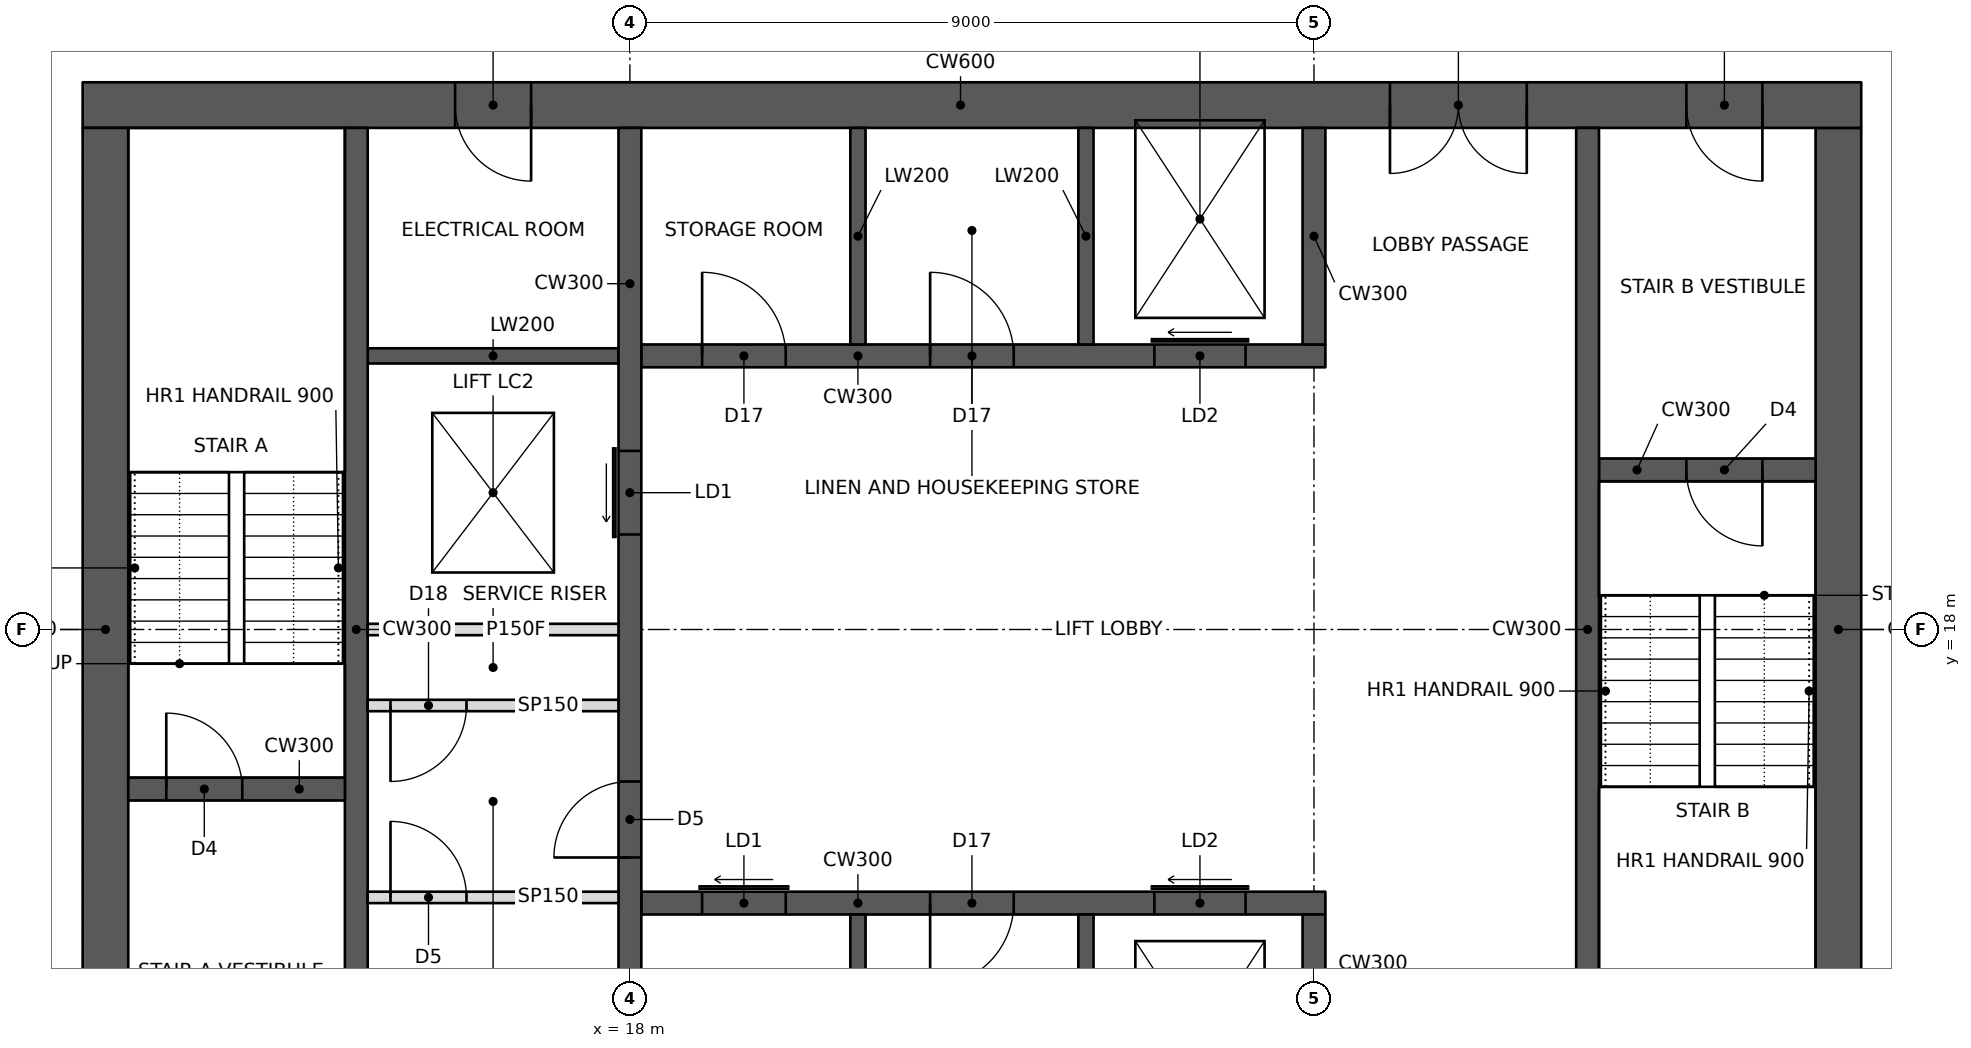
"""IFC4 building model, lengths in metres.
Left out: names, types, materials, properties, quantities, classifications, styles, units other than length and angle.
Written with IfcOpenShell. Run it as: python <this file> out.ifc"""

import sys

from ifc_helpers import new_model, si_unit, direction, frame, frame_2d, origin, place, context, subcontext, project, spatial, rectangle, extrude, element, fill, save


model = new_model("IFC4")
c1 = context("Model", 3, precision=1e-05, world=origin(), true_north=direction((0.0, 1.0)))
c2 = subcontext(c1, "Body", "Model", "MODEL_VIEW")
j1 = project(units=[si_unit("LENGTHUNIT", "METRE"), si_unit("PLANEANGLEUNIT", "RADIAN")], contexts=[c1])
p1 = place(None, origin())
s1 = spatial("IfcSite", under=j1, at=p1, CompositionType="ELEMENT")
p2 = place(p1, origin())
s2 = spatial("IfcBuilding", under=s1, at=p2, CompositionType="ELEMENT")
p3 = place(p2, frame((0.0, 0.0, 194.4)))
s3 = spatial("IfcBuildingStorey", under=s2, at=p3, CompositionType="ELEMENT", Elevation=194.4)
p4 = place(p3, frame((10.8, 24.9, 0.0), z_axis=(0.0, 0.0, 1.0), x_axis=(1.0, 0.0, 0.0)))
e1 = element("IfcWall", 1, at=p4, inside=s3, PredefinedType="SHEAR", context=c2, shape_type="SweptSolid", body=[
    extrude(rectangle(XDim=23.4, YDim=0.6, at=frame_2d((11.7, 0.0))), origin(), (0.0, 0.0, 1.0), 3.4),
])
p5 = place(p4, frame((17.2, 0.0, 0.0)))
e2 = element("IfcOpeningElement", 2, at=p5, cuts=e1, PredefinedType="OPENING", context=c2, shape_type="SweptSolid", body=[
    extrude(rectangle(XDim=1.8, YDim=2.1, at=frame_2d((0.9, 1.05))), frame((0.0, 0.31, 0.0), z_axis=(0.0, -1.0, 0.0), x_axis=(1.0, 0.0, 0.0)), (0.0, 0.0, 1.0), 0.62),
])
p6 = place(p4, frame((21.1, 0.0, 0.0)))
e3 = element("IfcOpeningElement", 3, at=p6, cuts=e1, PredefinedType="OPENING", context=c2, shape_type="SweptSolid", body=[
    extrude(rectangle(XDim=1.0, YDim=2.1, at=frame_2d((0.5, 1.05))), frame((0.0, 0.31, 0.0), z_axis=(0.0, -1.0, 0.0), x_axis=(1.0, 0.0, 0.0)), (0.0, 0.0, 1.0), 0.62),
])
p7 = place(p4, frame((4.9, 0.0, 0.0)))
e4 = element("IfcOpeningElement", 4, at=p7, cuts=e1, PredefinedType="OPENING", context=c2, shape_type="SweptSolid", body=[
    extrude(rectangle(XDim=1.0, YDim=2.1, at=frame_2d((0.5, 1.05))), frame((0.0, 0.31, 0.0), z_axis=(0.0, -1.0, 0.0), x_axis=(1.0, 0.0, 0.0)), (0.0, 0.0, 1.0), 0.62),
])
for number, where, z_axis, x_axis in (
    (5, (11.1, 11.4, 0.0), (0.0, 0.0, 1.0), (0.0, 1.0, 0.0)),
    (6, (33.9, 11.4, 0.0), (0.0, 0.0, 1.0), (0.0, 1.0, 0.0)),
):
    element("IfcWall", number, at=place(p3, frame(where, z_axis=z_axis, x_axis=x_axis)), inside=s3, PredefinedType="SHEAR", context=c2, shape_type="SweptSolid", body=[
        extrude(rectangle(XDim=13.2, YDim=0.6, at=frame_2d((6.6, 0.0))), origin(), (0.0, 0.0, 1.0), 3.4),
    ])
p8 = place(p3, frame((14.4, 11.4, 0.0), z_axis=(0.0, 0.0, 1.0), x_axis=(0.0, 1.0, 0.0)))
e7 = element("IfcWall", 7, at=p8, inside=s3, PredefinedType="SHEAR", context=c2, shape_type="SweptSolid", body=[
    extrude(rectangle(XDim=13.2, YDim=0.3, at=frame_2d((6.6, 0.0))), origin(), (0.0, 0.0, 1.0), 3.4),
])
p9 = place(p3, frame((11.4, 15.9, 0.0), z_axis=(0.0, 0.0, 1.0), x_axis=(1.0, 0.0, 0.0)))
e8 = element("IfcWall", 8, at=p9, inside=s3, PredefinedType="SHEAR", context=c2, shape_type="SweptSolid", body=[
    extrude(rectangle(XDim=2.85, YDim=0.3, at=frame_2d((1.425, 0.0))), origin(), (0.0, 0.0, 1.0), 3.4),
])
p10 = place(p9, frame((0.5, 0.0, 0.0)))
e9 = element("IfcOpeningElement", 9, at=p10, cuts=e8, PredefinedType="OPENING", context=c2, shape_type="SweptSolid", body=[
    extrude(rectangle(XDim=1.0, YDim=2.1, at=frame_2d((0.5, 1.05))), frame((0.0, 0.16, 0.0), z_axis=(0.0, -1.0, 0.0), x_axis=(1.0, 0.0, 0.0)), (0.0, 0.0, 1.0), 0.32),
])
p11 = place(p3, frame((18.0, 11.4, 0.0), z_axis=(0.0, 0.0, 1.0), x_axis=(0.0, 1.0, 0.0)))
e10 = element("IfcWall", 10, at=p11, inside=s3, PredefinedType="SHEAR", context=c2, shape_type="SweptSolid", body=[
    extrude(rectangle(XDim=13.2, YDim=0.3, at=frame_2d((6.6, 0.0))), origin(), (0.0, 0.0, 1.0), 3.4),
])
p12 = place(p11, frame((3.6, 0.0, 0.0)))
e11 = element("IfcOpeningElement", 11, at=p12, cuts=e10, PredefinedType="OPENING", context=c2, shape_type="SweptSolid", body=[
    extrude(rectangle(XDim=1.0, YDim=2.1, at=frame_2d((0.5, 1.05))), frame((0.0, 0.16, 0.0), z_axis=(0.0, -1.0, 0.0), x_axis=(1.0, 0.0, 0.0)), (0.0, 0.0, 1.0), 0.32),
])
p13 = place(p11, frame((7.85, 0.0, 0.0)))
e12 = element("IfcOpeningElement", 12, at=p13, cuts=e10, PredefinedType="OPENING", context=c2, shape_type="SweptSolid", body=[
    extrude(rectangle(XDim=1.1, YDim=2.1, at=frame_2d((0.55, 1.05))), frame((0.0, 0.16, 0.0), z_axis=(0.0, -1.0, 0.0), x_axis=(1.0, 0.0, 0.0)), (0.0, 0.0, 1.0), 0.32),
])
p14 = place(p3, frame((14.55, 18.0, 0.0), z_axis=(0.0, 0.0, 1.0), x_axis=(1.0, 0.0, 0.0)))
e13 = element("IfcWall", 13, at=p14, inside=s3, PredefinedType="PARTITIONING", context=c2, shape_type="SweptSolid", body=[
    extrude(rectangle(XDim=3.3, YDim=0.15, at=frame_2d((1.65, 0.0))), origin(), (0.0, 0.0, 1.0), 3.2),
])
p15 = place(p3, frame((18.15, 14.4, 0.0), z_axis=(0.0, 0.0, 1.0), x_axis=(1.0, 0.0, 0.0)))
e14 = element("IfcWall", 14, at=p15, inside=s3, PredefinedType="SHEAR", context=c2, shape_type="SweptSolid", body=[
    extrude(rectangle(XDim=9.0, YDim=0.3, at=frame_2d((4.5, 0.0))), origin(), (0.0, 0.0, 1.0), 3.4),
])
p16 = place(p15, frame((0.8, 0.0, 0.0)))
e15 = element("IfcOpeningElement", 15, at=p16, cuts=e14, PredefinedType="OPENING", context=c2, shape_type="SweptSolid", body=[
    extrude(rectangle(XDim=1.1, YDim=2.1, at=frame_2d((0.55, 1.05))), frame((0.0, 0.16, 0.0), z_axis=(0.0, -1.0, 0.0), x_axis=(1.0, 0.0, 0.0)), (0.0, 0.0, 1.0), 0.32),
])
p17 = place(p15, frame((6.75, 0.0, 0.0)))
e16 = element("IfcOpeningElement", 16, at=p17, cuts=e14, PredefinedType="OPENING", context=c2, shape_type="SweptSolid", body=[
    extrude(rectangle(XDim=1.2, YDim=2.1, at=frame_2d((0.6, 1.05))), frame((0.0, 0.16, 0.0), z_axis=(0.0, -1.0, 0.0), x_axis=(1.0, 0.0, 0.0)), (0.0, 0.0, 1.0), 0.32),
])
p18 = place(p15, frame((3.8, 0.0, 0.0)))
e17 = element("IfcOpeningElement", 17, at=p18, cuts=e14, PredefinedType="OPENING", context=c2, shape_type="SweptSolid", body=[
    extrude(rectangle(XDim=1.1, YDim=2.1, at=frame_2d((0.55, 1.05))), frame((0.0, 0.16, 0.0), z_axis=(0.0, -1.0, 0.0), x_axis=(1.0, 0.0, 0.0)), (0.0, 0.0, 1.0), 0.32),
])
p19 = place(p3, frame((27.0, 11.4, 0.0), z_axis=(0.0, 0.0, 1.0), x_axis=(0.0, 1.0, 0.0)))
e18 = element("IfcWall", 18, at=p19, inside=s3, PredefinedType="SHEAR", context=c2, shape_type="SweptSolid", body=[
    extrude(rectangle(XDim=2.85, YDim=0.3, at=frame_2d((1.425, 0.0))), origin(), (0.0, 0.0, 1.0), 3.4),
])
for number, where, z_axis, x_axis in (
    (19, (21.0, 11.4, 0.0), (0.0, 0.0, 1.0), (0.0, 1.0, 0.0)),
    (20, (24.0, 11.4, 0.0), (0.0, 0.0, 1.0), (0.0, 1.0, 0.0)),
):
    element("IfcWall", number, at=place(p3, frame(where, z_axis=z_axis, x_axis=x_axis)), inside=s3, PredefinedType="SHEAR", context=c2, shape_type="SweptSolid", body=[
        extrude(rectangle(XDim=2.85, YDim=0.2, at=frame_2d((1.425, 0.0))), origin(), (0.0, 0.0, 1.0), 3.4),
    ])
p20 = place(p3, frame((18.15, 21.6, 0.0), z_axis=(0.0, 0.0, 1.0), x_axis=(1.0, 0.0, 0.0)))
e21 = element("IfcWall", 21, at=p20, inside=s3, PredefinedType="SHEAR", context=c2, shape_type="SweptSolid", body=[
    extrude(rectangle(XDim=9.0, YDim=0.3, at=frame_2d((4.5, 0.0))), origin(), (0.0, 0.0, 1.0), 3.4),
])
p21 = place(p20, frame((6.75, 0.0, 0.0)))
e22 = element("IfcOpeningElement", 22, at=p21, cuts=e21, PredefinedType="OPENING", context=c2, shape_type="SweptSolid", body=[
    extrude(rectangle(XDim=1.2, YDim=2.1, at=frame_2d((0.6, 1.05))), frame((0.0, 0.16, 0.0), z_axis=(0.0, -1.0, 0.0), x_axis=(1.0, 0.0, 0.0)), (0.0, 0.0, 1.0), 0.32),
])
p22 = place(p20, frame((0.8, 0.0, 0.0)))
e23 = element("IfcOpeningElement", 23, at=p22, cuts=e21, PredefinedType="OPENING", context=c2, shape_type="SweptSolid", body=[
    extrude(rectangle(XDim=1.1, YDim=2.1, at=frame_2d((0.55, 1.05))), frame((0.0, 0.16, 0.0), z_axis=(0.0, -1.0, 0.0), x_axis=(1.0, 0.0, 0.0)), (0.0, 0.0, 1.0), 0.32),
])
p23 = place(p20, frame((3.8, 0.0, 0.0)))
e24 = element("IfcOpeningElement", 24, at=p23, cuts=e21, PredefinedType="OPENING", context=c2, shape_type="SweptSolid", body=[
    extrude(rectangle(XDim=1.1, YDim=2.1, at=frame_2d((0.55, 1.05))), frame((0.0, 0.16, 0.0), z_axis=(0.0, -1.0, 0.0), x_axis=(1.0, 0.0, 0.0)), (0.0, 0.0, 1.0), 0.32),
])
p24 = place(p3, frame((27.0, 21.75, 0.0), z_axis=(0.0, 0.0, 1.0), x_axis=(0.0, 1.0, 0.0)))
e25 = element("IfcWall", 25, at=p24, inside=s3, PredefinedType="SHEAR", context=c2, shape_type="SweptSolid", body=[
    extrude(rectangle(XDim=2.85, YDim=0.3, at=frame_2d((1.425, 0.0))), origin(), (0.0, 0.0, 1.0), 3.4),
])
for number, where, z_axis, x_axis in (
    (26, (21.0, 21.75, 0.0), (0.0, 0.0, 1.0), (0.0, 1.0, 0.0)),
    (27, (24.0, 21.75, 0.0), (0.0, 0.0, 1.0), (0.0, 1.0, 0.0)),
):
    element("IfcWall", number, at=place(p3, frame(where, z_axis=z_axis, x_axis=x_axis)), inside=s3, PredefinedType="SHEAR", context=c2, shape_type="SweptSolid", body=[
        extrude(rectangle(XDim=2.85, YDim=0.2, at=frame_2d((1.425, 0.0))), origin(), (0.0, 0.0, 1.0), 3.4),
    ])
p25 = place(p3, frame((30.6, 11.4, 0.0), z_axis=(0.0, 0.0, 1.0), x_axis=(0.0, 1.0, 0.0)))
e28 = element("IfcWall", 28, at=p25, inside=s3, PredefinedType="SHEAR", context=c2, shape_type="SweptSolid", body=[
    extrude(rectangle(XDim=13.2, YDim=0.3, at=frame_2d((6.6, 0.0))), origin(), (0.0, 0.0, 1.0), 3.4),
])
p26 = place(p3, frame((30.75, 20.1, 0.0), z_axis=(0.0, 0.0, 1.0), x_axis=(1.0, 0.0, 0.0)))
e29 = element("IfcWall", 29, at=p26, inside=s3, PredefinedType="SHEAR", context=c2, shape_type="SweptSolid", body=[
    extrude(rectangle(XDim=2.85, YDim=0.3, at=frame_2d((1.425, 0.0))), origin(), (0.0, 0.0, 1.0), 3.4),
])
p27 = place(p26, frame((1.15, 0.0, 0.0)))
e30 = element("IfcOpeningElement", 30, at=p27, cuts=e29, PredefinedType="OPENING", context=c2, shape_type="SweptSolid", body=[
    extrude(rectangle(XDim=1.0, YDim=2.1, at=frame_2d((0.5, 1.05))), frame((0.0, 0.16, 0.0), z_axis=(0.0, -1.0, 0.0), x_axis=(1.0, 0.0, 0.0)), (0.0, 0.0, 1.0), 0.32),
])
p28 = place(p3, frame((14.55, 21.6, 0.0), z_axis=(0.0, 0.0, 1.0), x_axis=(1.0, 0.0, 0.0)))
e31 = element("IfcWall", 31, at=p28, inside=s3, PredefinedType="SHEAR", context=c2, shape_type="SweptSolid", body=[
    extrude(rectangle(XDim=3.3, YDim=0.2, at=frame_2d((1.65, 0.0))), origin(), (0.0, 0.0, 1.0), 3.4),
])
p29 = place(p3, frame((14.55, 17.0, 0.0), z_axis=(0.0, 0.0, 1.0), x_axis=(1.0, 0.0, 0.0)))
e32 = element("IfcWall", 32, at=p29, inside=s3, PredefinedType="PARTITIONING", context=c2, shape_type="SweptSolid", body=[
    extrude(rectangle(XDim=3.3, YDim=0.15, at=frame_2d((1.65, 0.0))), origin(), (0.0, 0.0, 1.0), 3.2),
])
p30 = place(p29, frame((0.3, 0.0, 0.0)))
e33 = element("IfcOpeningElement", 33, at=p30, cuts=e32, PredefinedType="OPENING", context=c2, shape_type="SweptSolid", body=[
    extrude(rectangle(XDim=1.0, YDim=2.1, at=frame_2d((0.5, 1.05))), frame((0.0, 0.085, 0.0), z_axis=(0.0, -1.0, 0.0), x_axis=(1.0, 0.0, 0.0)), (0.0, 0.0, 1.0), 0.17),
])
p31 = place(p3, frame((14.55, 14.475, 0.0), z_axis=(0.0, 0.0, 1.0), x_axis=(1.0, 0.0, 0.0)))
e34 = element("IfcWall", 34, at=p31, inside=s3, PredefinedType="PARTITIONING", context=c2, shape_type="SweptSolid", body=[
    extrude(rectangle(XDim=3.3, YDim=0.15, at=frame_2d((1.65, 0.0))), origin(), (0.0, 0.0, 1.0), 3.2),
])
p32 = place(p31, frame((0.3, 0.0, 0.0)))
e35 = element("IfcOpeningElement", 35, at=p32, cuts=e34, PredefinedType="OPENING", context=c2, shape_type="SweptSolid", body=[
    extrude(rectangle(XDim=1.0, YDim=2.1, at=frame_2d((0.5, 1.05))), frame((0.0, 0.085, 0.0), z_axis=(0.0, -1.0, 0.0), x_axis=(1.0, 0.0, 0.0)), (0.0, 0.0, 1.0), 0.17),
])
p33 = place(p30, frame((1.0, 0.0, 0.0), z_axis=(0.0, 0.0, 1.0), x_axis=(-1.0, 0.0, 0.0)))
e36 = element("IfcDoor", 36, at=p33, inside=s3, OperationType="SINGLE_SWING_RIGHT", PredefinedType="DOOR", context=c2, shape_type="SweptSolid", body=[
    extrude(rectangle(XDim=1.0, YDim=2.1, at=frame_2d((0.5, 1.05))), frame((0.0, 0.025, 0.0), z_axis=(0.0, -1.0, 0.0), x_axis=(1.0, 0.0, 0.0)), (0.0, 0.0, 1.0), 0.05),
])
fill(e33, e36)
p34 = place(p32, origin())
e37 = element("IfcDoor", 37, at=p34, inside=s3, OperationType="SINGLE_SWING_LEFT", PredefinedType="DOOR", context=c2, shape_type="SweptSolid", body=[
    extrude(rectangle(XDim=1.0, YDim=2.1, at=frame_2d((0.5, 1.05))), frame((0.0, 0.025, 0.0), z_axis=(0.0, -1.0, 0.0), x_axis=(1.0, 0.0, 0.0)), (0.0, 0.0, 1.0), 0.05),
])
fill(e35, e37)
p35 = place(p10, origin())
e38 = element("IfcDoor", 38, at=p35, inside=s3, OperationType="SINGLE_SWING_LEFT", PredefinedType="DOOR", context=c2, shape_type="SweptSolid", body=[
    extrude(rectangle(XDim=1.0, YDim=2.1, at=frame_2d((0.5, 1.05))), frame((0.0, 0.025, 0.0), z_axis=(0.0, -1.0, 0.0), x_axis=(1.0, 0.0, 0.0)), (0.0, 0.0, 1.0), 0.05),
])
fill(e9, e38)
p36 = place(p5, frame((1.8, 0.0, 0.0), z_axis=(0.0, 0.0, 1.0), x_axis=(-1.0, 0.0, 0.0)))
e39 = element("IfcDoor", 39, at=p36, inside=s3, OperationType="DOUBLE_DOOR_SINGLE_SWING", PredefinedType="DOOR", context=c2, shape_type="SweptSolid", body=[
    extrude(rectangle(XDim=1.8, YDim=2.1, at=frame_2d((0.9, 1.05))), frame((0.0, 0.025, 0.0), z_axis=(0.0, -1.0, 0.0), x_axis=(1.0, 0.0, 0.0)), (0.0, 0.0, 1.0), 0.05),
])
fill(e2, e39)
p37 = place(p6, frame((1.0, 0.0, 0.0), z_axis=(0.0, 0.0, 1.0), x_axis=(-1.0, 0.0, 0.0)))
e40 = element("IfcDoor", 40, at=p37, inside=s3, OperationType="SINGLE_SWING_LEFT", PredefinedType="DOOR", context=c2, shape_type="SweptSolid", body=[
    extrude(rectangle(XDim=1.0, YDim=2.1, at=frame_2d((0.5, 1.05))), frame((0.0, 0.025, 0.0), z_axis=(0.0, -1.0, 0.0), x_axis=(1.0, 0.0, 0.0)), (0.0, 0.0, 1.0), 0.05),
])
fill(e3, e40)
p38 = place(p27, frame((1.0, 0.0, 0.0), z_axis=(0.0, 0.0, 1.0), x_axis=(-1.0, 0.0, 0.0)))
e41 = element("IfcDoor", 41, at=p38, inside=s3, OperationType="SINGLE_SWING_LEFT", PredefinedType="DOOR", context=c2, shape_type="SweptSolid", body=[
    extrude(rectangle(XDim=1.0, YDim=2.1, at=frame_2d((0.5, 1.05))), frame((0.0, 0.025, 0.0), z_axis=(0.0, -1.0, 0.0), x_axis=(1.0, 0.0, 0.0)), (0.0, 0.0, 1.0), 0.05),
])
fill(e30, e41)
p39 = place(p12, origin())
e42 = element("IfcDoor", 42, at=p39, inside=s3, OperationType="SINGLE_SWING_LEFT", PredefinedType="DOOR", context=c2, shape_type="SweptSolid", body=[
    extrude(rectangle(XDim=1.0, YDim=2.1, at=frame_2d((0.5, 1.05))), frame((0.0, 0.025, 0.0), z_axis=(0.0, -1.0, 0.0), x_axis=(1.0, 0.0, 0.0)), (0.0, 0.0, 1.0), 0.05),
])
fill(e11, e42)
p40 = place(p7, frame((1.0, 0.0, 0.0), z_axis=(0.0, 0.0, 1.0), x_axis=(-1.0, 0.0, 0.0)))
e43 = element("IfcDoor", 43, at=p40, inside=s3, OperationType="SINGLE_SWING_LEFT", PredefinedType="DOOR", context=c2, shape_type="SweptSolid", body=[
    extrude(rectangle(XDim=1.0, YDim=2.1, at=frame_2d((0.5, 1.05))), frame((0.0, 0.025, 0.0), z_axis=(0.0, -1.0, 0.0), x_axis=(1.0, 0.0, 0.0)), (0.0, 0.0, 1.0), 0.05),
])
fill(e4, e43)
p41 = place(p16, origin())
e44 = element("IfcDoor", 44, at=p41, inside=s3, OperationType="SLIDING_TO_LEFT", PredefinedType="DOOR", context=c2, shape_type="SweptSolid", body=[
    extrude(rectangle(XDim=1.1, YDim=2.1, at=frame_2d((0.55, 1.05))), frame((0.0, 0.025, 0.0), z_axis=(0.0, -1.0, 0.0), x_axis=(1.0, 0.0, 0.0)), (0.0, 0.0, 1.0), 0.05),
])
fill(e15, e44)
p42 = place(p13, origin())
e45 = element("IfcDoor", 45, at=p42, inside=s3, OperationType="SLIDING_TO_LEFT", PredefinedType="DOOR", context=c2, shape_type="SweptSolid", body=[
    extrude(rectangle(XDim=1.1, YDim=2.1, at=frame_2d((0.55, 1.05))), frame((0.0, 0.025, 0.0), z_axis=(0.0, -1.0, 0.0), x_axis=(1.0, 0.0, 0.0)), (0.0, 0.0, 1.0), 0.05),
])
fill(e12, e45)
p43 = place(p17, origin())
e46 = element("IfcDoor", 46, at=p43, inside=s3, OperationType="SLIDING_TO_LEFT", PredefinedType="DOOR", context=c2, shape_type="SweptSolid", body=[
    extrude(rectangle(XDim=1.2, YDim=2.1, at=frame_2d((0.6, 1.05))), frame((0.0, 0.025, 0.0), z_axis=(0.0, -1.0, 0.0), x_axis=(1.0, 0.0, 0.0)), (0.0, 0.0, 1.0), 0.05),
])
fill(e16, e46)
p44 = place(p21, origin())
e47 = element("IfcDoor", 47, at=p44, inside=s3, OperationType="SLIDING_TO_LEFT", PredefinedType="DOOR", context=c2, shape_type="SweptSolid", body=[
    extrude(rectangle(XDim=1.2, YDim=2.1, at=frame_2d((0.6, 1.05))), frame((0.0, 0.025, 0.0), z_axis=(0.0, -1.0, 0.0), x_axis=(1.0, 0.0, 0.0)), (0.0, 0.0, 1.0), 0.05),
])
fill(e22, e47)
p45 = place(p22, origin())
e48 = element("IfcDoor", 48, at=p45, inside=s3, OperationType="SINGLE_SWING_LEFT", PredefinedType="DOOR", context=c2, shape_type="SweptSolid", body=[
    extrude(rectangle(XDim=1.1, YDim=2.1, at=frame_2d((0.55, 1.05))), frame((0.0, 0.025, 0.0), z_axis=(0.0, -1.0, 0.0), x_axis=(1.0, 0.0, 0.0)), (0.0, 0.0, 1.0), 0.05),
])
fill(e23, e48)
p46 = place(p23, origin())
e49 = element("IfcDoor", 49, at=p46, inside=s3, OperationType="SINGLE_SWING_LEFT", PredefinedType="DOOR", context=c2, shape_type="SweptSolid", body=[
    extrude(rectangle(XDim=1.1, YDim=2.1, at=frame_2d((0.55, 1.05))), frame((0.0, 0.025, 0.0), z_axis=(0.0, -1.0, 0.0), x_axis=(1.0, 0.0, 0.0)), (0.0, 0.0, 1.0), 0.05),
])
fill(e24, e49)
p47 = place(p18, frame((1.1, 0.0, 0.0), z_axis=(0.0, 0.0, 1.0), x_axis=(-1.0, 0.0, 0.0)))
e50 = element("IfcDoor", 50, at=p47, inside=s3, OperationType="SINGLE_SWING_RIGHT", PredefinedType="DOOR", context=c2, shape_type="SweptSolid", body=[
    extrude(rectangle(XDim=1.1, YDim=2.1, at=frame_2d((0.55, 1.05))), frame((0.0, 0.025, 0.0), z_axis=(0.0, -1.0, 0.0), x_axis=(1.0, 0.0, 0.0)), (0.0, 0.0, 1.0), 0.05),
])
fill(e17, e50)
save(model, sys.argv[1])
